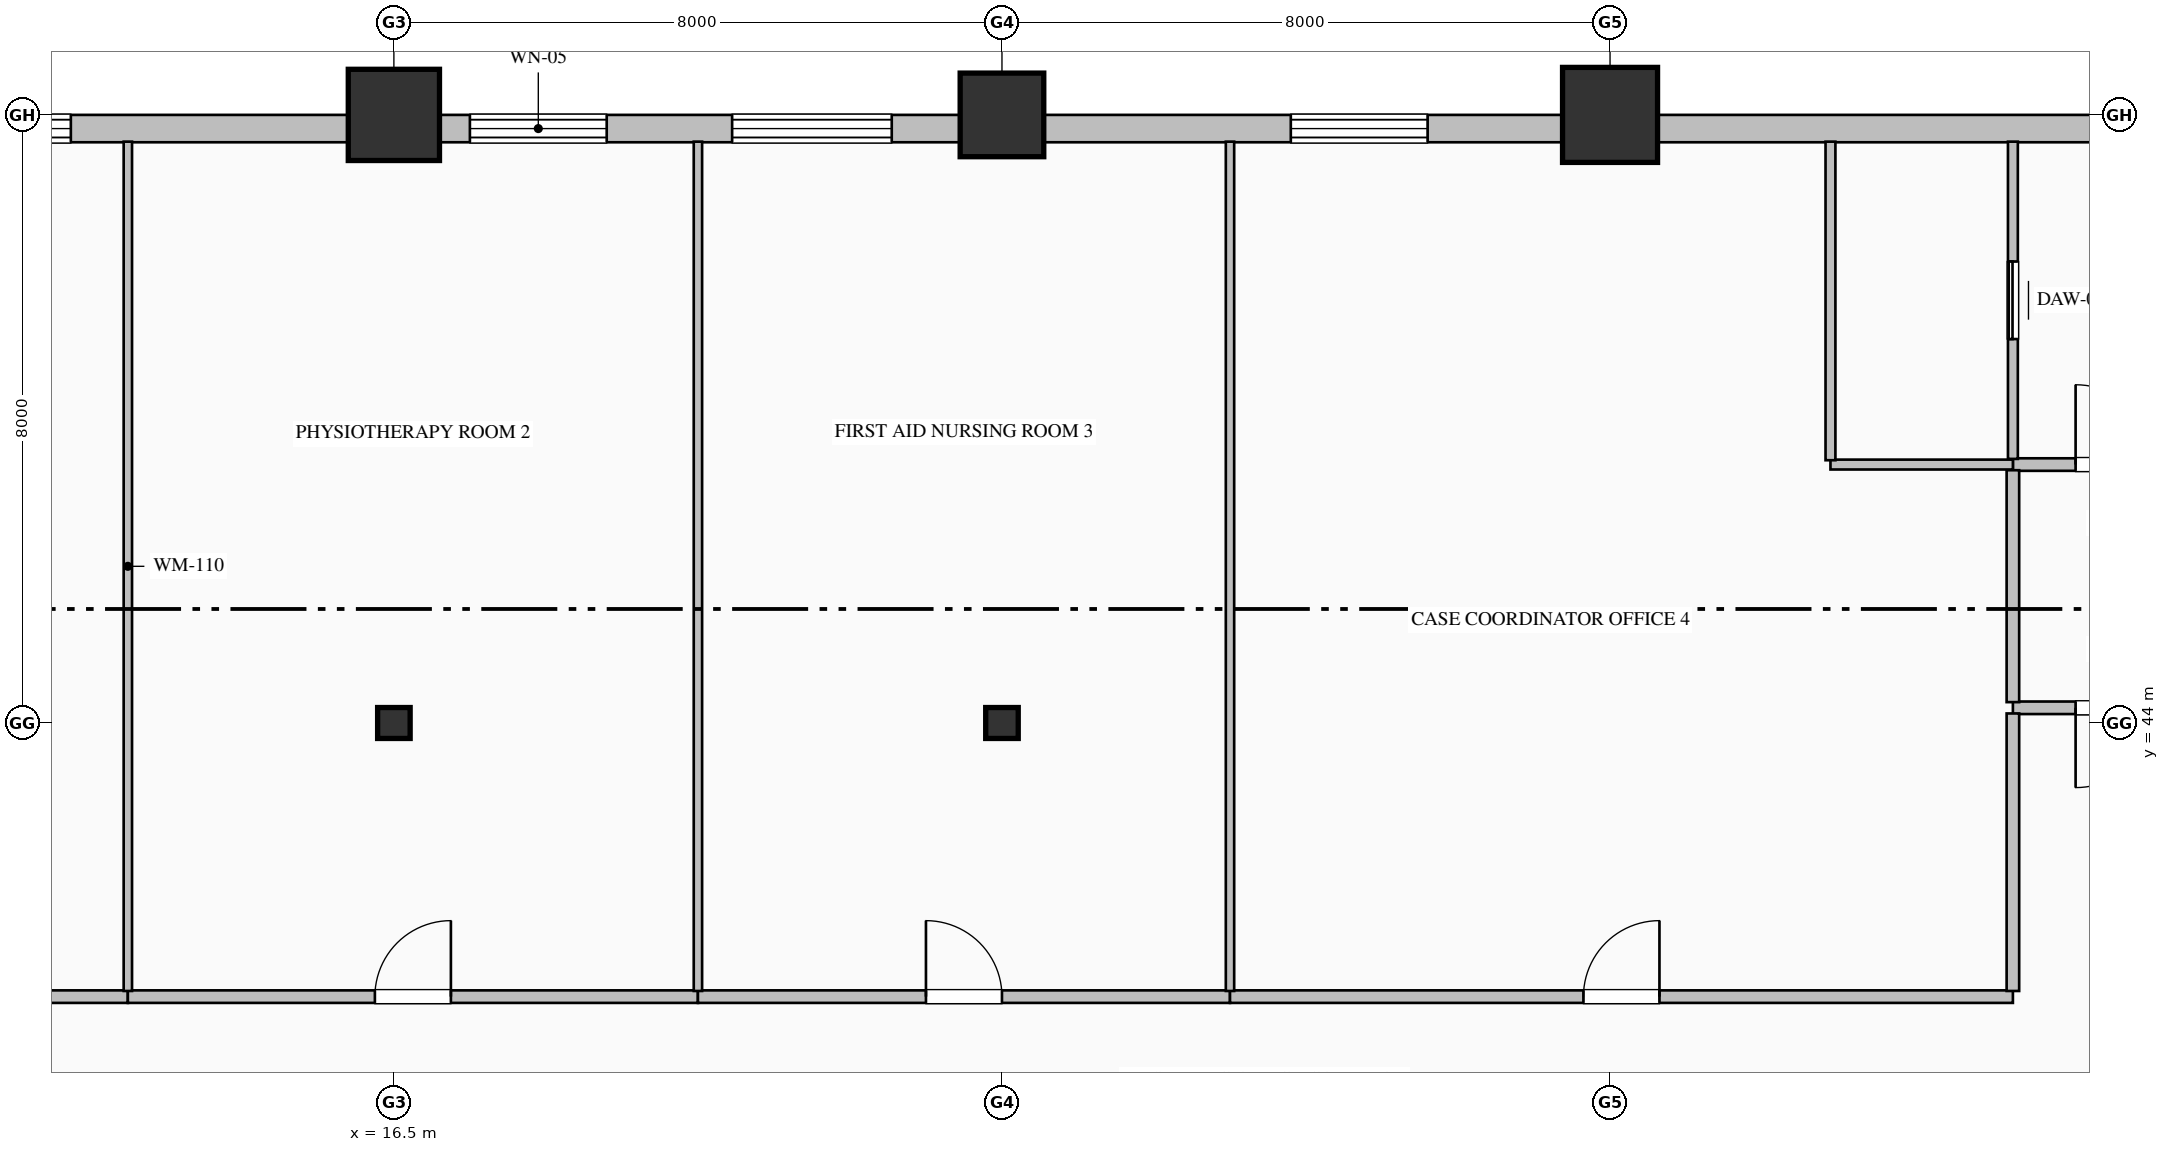
"""IFC4 building model, lengths in metres.
Left out: names, types, materials, properties, quantities, classifications, styles, units other than length and angle.
Written with IfcOpenShell. Run it as: python <this file> out.ifc"""

import sys

from ifc_helpers import new_model, si_unit, direction, frame, frame_2d, origin, origin_2d, place, context, subcontext, project, spatial, rectangle, hollow_rectangle, hollow_circle, i_section, extrude, element, fill, save


model = new_model("IFC4")
c1 = context("Model", 3, precision=1e-05, world=origin(), true_north=direction((0.0, 1.0)))
c2 = subcontext(c1, "Body", "Model", "MODEL_VIEW")
j1 = project(units=[si_unit("LENGTHUNIT", "METRE"), si_unit("PLANEANGLEUNIT", "RADIAN")], contexts=[c1])
p1 = place(None, origin())
s1 = spatial("IfcSite", under=j1, at=p1, CompositionType="ELEMENT")
p2 = place(p1, origin())
s2 = spatial("IfcBuilding", under=s1, at=p2, CompositionType="ELEMENT")
p3 = place(p2, frame((0.0, 0.0, 80.2)))
s3 = spatial("IfcBuildingStorey", under=s2, at=p3, CompositionType="ELEMENT", Elevation=80.2)
p4 = place(p3, frame((16.5, 44.0, 0.0), z_axis=(0.0, 0.0, 1.0), x_axis=(1.0, 0.0, 0.0)))
e1 = element("IfcColumn", 1, at=p4, inside=s3, PredefinedType="COLUMN", context=c2, shape_type="SweptSolid", body=[
    extrude(i_section(OverallWidth=0.407, OverallDepth=0.428, WebThickness=0.02, FlangeThickness=0.035, FilletRadius=0.022, at=origin_2d()), origin(), (0.0, 0.0, 1.0), 4.0),
])
p5 = place(p3, frame((16.5, 52.0, 0.0), z_axis=(0.0, 0.0, 1.0), x_axis=(1.0, 0.0, 0.0)))
e2 = element("IfcColumn", 2, at=p5, inside=s3, PredefinedType="COLUMN", context=c2, shape_type="SweptSolid", body=[
    extrude(hollow_circle(Radius=0.6, WallThickness=0.04, at=origin_2d()), origin(), (0.0, 0.0, 1.0), 4.0),
])
p6 = place(p3, frame((24.5, 44.0, 0.0), z_axis=(0.0, 0.0, 1.0), x_axis=(1.0, 0.0, 0.0)))
e3 = element("IfcColumn", 3, at=p6, inside=s3, PredefinedType="COLUMN", context=c2, shape_type="SweptSolid", body=[
    extrude(i_section(OverallWidth=0.407, OverallDepth=0.428, WebThickness=0.02, FlangeThickness=0.035, FilletRadius=0.022, at=origin_2d()), origin(), (0.0, 0.0, 1.0), 4.0),
])
p7 = place(p3, frame((24.5, 52.0, 0.0), z_axis=(0.0, 0.0, 1.0), x_axis=(1.0, 0.0, 0.0)))
e4 = element("IfcColumn", 4, at=p7, inside=s3, PredefinedType="COLUMN", context=c2, shape_type="SweptSolid", body=[
    extrude(hollow_rectangle(XDim=1.1, YDim=1.1, WallThickness=0.04, at=origin_2d()), origin(), (0.0, 0.0, 1.0), 4.0),
])
p8 = place(p3, frame((32.5, 52.0, 0.0), z_axis=(0.0, 0.0, 1.0), x_axis=(1.0, 0.0, 0.0)))
e5 = element("IfcColumn", 5, at=p8, inside=s3, PredefinedType="COLUMN", context=c2, shape_type="SweptSolid", body=[
    extrude(hollow_rectangle(XDim=1.25, YDim=1.25, WallThickness=0.045, at=origin_2d()), origin(), (0.0, 0.0, 1.0), 4.0),
])
p9 = place(p3, frame((4.0, 51.82, 0.0), z_axis=(0.0, 0.0, 1.0), x_axis=(1.0, 0.0, 0.0)))
e6 = element("IfcWall", 6, at=p9, inside=s3, PredefinedType="SOLIDWALL", context=c2, shape_type="SweptSolid", body=[
    extrude(rectangle(XDim=36.52, YDim=0.36, at=frame_2d((18.26, 0.0))), origin(), (0.0, 0.0, 1.0), 3.25),
])
p10 = place(p9, frame((6.15, 0.0, 0.85)))
e7 = element("IfcOpeningElement", 7, at=p10, cuts=e6, PredefinedType="OPENING", context=c2, shape_type="SweptSolid", body=[
    extrude(rectangle(XDim=2.1, YDim=2.05, at=frame_2d((1.05, 1.025))), frame((0.0, 0.19, 0.0), z_axis=(0.0, -1.0, 0.0), x_axis=(1.0, 0.0, 0.0)), (0.0, 0.0, 1.0), 0.38),
])
p11 = place(p9, frame((13.5, 0.0, 0.85)))
e8 = element("IfcOpeningElement", 8, at=p11, cuts=e6, PredefinedType="OPENING", context=c2, shape_type="SweptSolid", body=[
    extrude(rectangle(XDim=1.8, YDim=2.05, at=frame_2d((0.9, 1.025))), frame((0.0, 0.19, 0.0), z_axis=(0.0, -1.0, 0.0), x_axis=(1.0, 0.0, 0.0)), (0.0, 0.0, 1.0), 0.38),
])
p12 = place(p9, frame((16.95, 0.0, 0.85)))
e9 = element("IfcOpeningElement", 9, at=p12, cuts=e6, PredefinedType="OPENING", context=c2, shape_type="SweptSolid", body=[
    extrude(rectangle(XDim=2.1, YDim=2.05, at=frame_2d((1.05, 1.025))), frame((0.0, 0.19, 0.0), z_axis=(0.0, -1.0, 0.0), x_axis=(1.0, 0.0, 0.0)), (0.0, 0.0, 1.0), 0.38),
])
p13 = place(p9, frame((24.3, 0.0, 0.85)))
e10 = element("IfcOpeningElement", 10, at=p13, cuts=e6, PredefinedType="OPENING", context=c2, shape_type="SweptSolid", body=[
    extrude(rectangle(XDim=1.8, YDim=2.05, at=frame_2d((0.9, 1.025))), frame((0.0, 0.19, 0.0), z_axis=(0.0, -1.0, 0.0), x_axis=(1.0, 0.0, 0.0)), (0.0, 0.0, 1.0), 0.38),
])
p14 = place(p3, frame((37.8, 47.4, 0.0), z_axis=(0.0, 0.0, 1.0), x_axis=(1.0, 0.0, 0.0)))
e11 = element("IfcWall", 11, at=p14, inside=s3, PredefinedType="PARTITIONING", context=c2, shape_type="SweptSolid", body=[
    extrude(rectangle(XDim=2.7, YDim=0.165, at=frame_2d((1.35, 0.0))), origin(), (0.0, 0.0, 1.0), 3.75),
])
p15 = place(p14, frame((0.825, 0.0, 0.0)))
e12 = element("IfcOpeningElement", 12, at=p15, cuts=e11, PredefinedType="OPENING", context=c2, shape_type="SweptSolid", body=[
    extrude(rectangle(XDim=1.05, YDim=2.15, at=frame_2d((0.525, 1.075))), frame((0.0, 0.093, 0.0), z_axis=(0.0, -1.0, 0.0), x_axis=(1.0, 0.0, 0.0)), (0.0, 0.0, 1.0), 0.185),
])
p16 = place(p3, frame((40.5, 44.2, 0.0), z_axis=(0.0, 0.0, 1.0), x_axis=(-1.0, 0.0, 0.0)))
e13 = element("IfcWall", 13, at=p16, inside=s3, PredefinedType="PARTITIONING", context=c2, shape_type="SweptSolid", body=[
    extrude(rectangle(XDim=2.7, YDim=0.165, at=frame_2d((1.35, 0.0))), origin(), (0.0, 0.0, 1.0), 3.75),
])
p17 = place(p16, frame((0.825, 0.0, 0.0)))
e14 = element("IfcOpeningElement", 14, at=p17, cuts=e13, PredefinedType="OPENING", context=c2, shape_type="SweptSolid", body=[
    extrude(rectangle(XDim=1.05, YDim=2.15, at=frame_2d((0.525, 1.075))), frame((0.0, 0.093, 0.0), z_axis=(0.0, -1.0, 0.0), x_axis=(1.0, 0.0, 0.0)), (0.0, 0.0, 1.0), 0.185),
])
p18 = place(p3, frame((37.8, 44.274, 0.0), z_axis=(0.0, 0.0, 1.0), x_axis=(0.0, 1.0, 0.0)))
e15 = element("IfcWall", 15, at=p18, inside=s3, PredefinedType="PARTITIONING", context=c2, shape_type="SweptSolid", body=[
    extrude(rectangle(XDim=3.051, YDim=0.165, at=frame_2d((1.525, 0.0))), origin(), (0.0, 0.0, 1.0), 3.75),
])
p19 = place(p3, frame((37.8, 47.475, 0.0), z_axis=(0.0, 0.0, 1.0), x_axis=(0.0, 1.0, 0.0)))
e16 = element("IfcWall", 16, at=p19, inside=s3, PredefinedType="PARTITIONING", context=c2, shape_type="SweptSolid", body=[
    extrude(rectangle(XDim=4.173, YDim=0.13, at=frame_2d((2.087, 0.0))), origin(), (0.0, 0.0, 1.0), 3.75),
])
p20 = place(p19, frame((1.577, 0.0, 0.0)))
e17 = element("IfcOpeningElement", 17, at=p20, cuts=e16, PredefinedType="OPENING", context=c2, shape_type="SweptSolid", body=[
    extrude(rectangle(XDim=1.02, YDim=2.15, at=frame_2d((0.51, 1.075))), frame((0.0, 0.075, 0.0), z_axis=(0.0, -1.0, 0.0), x_axis=(1.0, 0.0, 0.0)), (0.0, 0.0, 1.0), 0.15),
])
p21 = place(p3, frame((37.8, 47.4, 0.0), z_axis=(0.0, 0.0, 1.0), x_axis=(-1.0, 0.0, 0.0)))
e18 = element("IfcWall", 18, at=p21, inside=s3, PredefinedType="PARTITIONING", context=c2, shape_type="SweptSolid", body=[
    extrude(rectangle(XDim=2.4, YDim=0.13, at=frame_2d((1.2, 0.0))), origin(), (0.0, 0.0, 1.0), 3.75),
])
p22 = place(p3, frame((35.4, 47.457, 0.0), z_axis=(0.0, 0.0, 1.0), x_axis=(0.0, 1.0, 0.0)))
e19 = element("IfcWall", 19, at=p22, inside=s3, PredefinedType="PARTITIONING", context=c2, shape_type="SweptSolid", body=[
    extrude(rectangle(XDim=4.191, YDim=0.13, at=frame_2d((2.095, 0.0))), origin(), (0.0, 0.0, 1.0), 3.75),
])
p23 = place(p3, frame((9.0, 40.4, 0.0), z_axis=(0.0, 0.0, 1.0), x_axis=(1.0, 0.0, 0.0)))
e20 = element("IfcWall", 20, at=p23, inside=s3, PredefinedType="PARTITIONING", context=c2, shape_type="SweptSolid", body=[
    extrude(rectangle(XDim=4.0, YDim=0.165, at=frame_2d((2.0, 0.0))), origin(), (0.0, 0.0, 1.0), 3.75),
])
p24 = place(p23, frame((1.5, 0.0, 0.0)))
e21 = element("IfcOpeningElement", 21, at=p24, cuts=e20, PredefinedType="OPENING", context=c2, shape_type="SweptSolid", body=[
    extrude(rectangle(XDim=1.0, YDim=2.15, at=frame_2d((0.5, 1.075))), frame((0.0, 0.093, 0.0), z_axis=(0.0, -1.0, 0.0), x_axis=(1.0, 0.0, 0.0)), (0.0, 0.0, 1.0), 0.185),
])
p25 = place(p3, frame((13.0, 40.4, 0.0), z_axis=(0.0, 0.0, 1.0), x_axis=(1.0, 0.0, 0.0)))
e22 = element("IfcWall", 22, at=p25, inside=s3, PredefinedType="PARTITIONING", context=c2, shape_type="SweptSolid", body=[
    extrude(rectangle(XDim=7.5, YDim=0.165, at=frame_2d((3.75, 0.0))), origin(), (0.0, 0.0, 1.0), 3.75),
])
p26 = place(p25, frame((3.25, 0.0, 0.0)))
e23 = element("IfcOpeningElement", 23, at=p26, cuts=e22, PredefinedType="OPENING", context=c2, shape_type="SweptSolid", body=[
    extrude(rectangle(XDim=1.0, YDim=2.15, at=frame_2d((0.5, 1.075))), frame((0.0, 0.093, 0.0), z_axis=(0.0, -1.0, 0.0), x_axis=(1.0, 0.0, 0.0)), (0.0, 0.0, 1.0), 0.185),
])
p27 = place(p3, frame((20.5, 40.4, 0.0), z_axis=(0.0, 0.0, 1.0), x_axis=(1.0, 0.0, 0.0)))
e24 = element("IfcWall", 24, at=p27, inside=s3, PredefinedType="PARTITIONING", context=c2, shape_type="SweptSolid", body=[
    extrude(rectangle(XDim=7.0, YDim=0.165, at=frame_2d((3.5, 0.0))), origin(), (0.0, 0.0, 1.0), 3.75),
])
p28 = place(p27, frame((3.0, 0.0, 0.0)))
e25 = element("IfcOpeningElement", 25, at=p28, cuts=e24, PredefinedType="OPENING", context=c2, shape_type="SweptSolid", body=[
    extrude(rectangle(XDim=1.0, YDim=2.15, at=frame_2d((0.5, 1.075))), frame((0.0, 0.093, 0.0), z_axis=(0.0, -1.0, 0.0), x_axis=(1.0, 0.0, 0.0)), (0.0, 0.0, 1.0), 0.185),
])
p29 = place(p3, frame((27.5, 40.4, 0.0), z_axis=(0.0, 0.0, 1.0), x_axis=(1.0, 0.0, 0.0)))
e26 = element("IfcWall", 26, at=p29, inside=s3, PredefinedType="PARTITIONING", context=c2, shape_type="SweptSolid", body=[
    extrude(rectangle(XDim=10.3, YDim=0.165, at=frame_2d((5.15, 0.0))), origin(), (0.0, 0.0, 1.0), 3.75),
])
p30 = place(p29, frame((4.65, 0.0, 0.0)))
e27 = element("IfcOpeningElement", 27, at=p30, cuts=e26, PredefinedType="OPENING", context=c2, shape_type="SweptSolid", body=[
    extrude(rectangle(XDim=1.0, YDim=2.15, at=frame_2d((0.5, 1.075))), frame((0.0, 0.093, 0.0), z_axis=(0.0, -1.0, 0.0), x_axis=(1.0, 0.0, 0.0)), (0.0, 0.0, 1.0), 0.185),
])
p31 = place(p3, frame((37.8, 40.475, 0.0), z_axis=(0.0, 0.0, 1.0), x_axis=(0.0, 1.0, 0.0)))
e28 = element("IfcWall", 28, at=p31, inside=s3, PredefinedType="PARTITIONING", context=c2, shape_type="SweptSolid", body=[
    extrude(rectangle(XDim=3.651, YDim=0.165, at=frame_2d((1.825, 0.0))), origin(), (0.0, 0.0, 1.0), 3.75),
])
for number, where, z_axis, x_axis in (
    (29, (13.0, 51.648, 0.0), (0.0, 0.0, 1.0), (0.0, -1.0, 0.0)),
    (30, (20.5, 51.648, 0.0), (0.0, 0.0, 1.0), (0.0, -1.0, 0.0)),
    (31, (27.5, 51.648, 0.0), (0.0, 0.0, 1.0), (0.0, -1.0, 0.0)),
):
    element("IfcWall", number, at=place(p3, frame(where, z_axis=z_axis, x_axis=x_axis)), inside=s3, PredefinedType="MOVABLE", context=c2, shape_type="SweptSolid", body=[
        extrude(rectangle(XDim=11.173, YDim=0.11, at=frame_2d((5.587, 0.0))), origin(), (0.0, 0.0, 1.0), 3.75),
    ])
p32 = place(p10, origin())
e32 = element("IfcWindow", 32, at=p32, inside=s3, PartitioningType="TRIPLE_PANEL_VERTICAL", PredefinedType="WINDOW", context=c2, shape_type="SweptSolid", body=[
    extrude(rectangle(XDim=2.1, YDim=2.05, at=frame_2d((1.05, 1.025))), frame((0.0, 0.15, 0.0), z_axis=(0.0, -1.0, 0.0), x_axis=(1.0, 0.0, 0.0)), (0.0, 0.0, 1.0), 0.06),
])
fill(e7, e32)
p33 = place(p11, origin())
e33 = element("IfcWindow", 33, at=p33, inside=s3, PartitioningType="TRIPLE_PANEL_VERTICAL", PredefinedType="WINDOW", context=c2, shape_type="SweptSolid", body=[
    extrude(rectangle(XDim=1.8, YDim=2.05, at=frame_2d((0.9, 1.025))), frame((0.0, 0.15, 0.0), z_axis=(0.0, -1.0, 0.0), x_axis=(1.0, 0.0, 0.0)), (0.0, 0.0, 1.0), 0.06),
])
fill(e8, e33)
p34 = place(p12, origin())
e34 = element("IfcWindow", 34, at=p34, inside=s3, PartitioningType="TRIPLE_PANEL_VERTICAL", PredefinedType="WINDOW", context=c2, shape_type="SweptSolid", body=[
    extrude(rectangle(XDim=2.1, YDim=2.05, at=frame_2d((1.05, 1.025))), frame((0.0, 0.15, 0.0), z_axis=(0.0, -1.0, 0.0), x_axis=(1.0, 0.0, 0.0)), (0.0, 0.0, 1.0), 0.06),
])
fill(e9, e34)
p35 = place(p13, origin())
e35 = element("IfcWindow", 35, at=p35, inside=s3, PartitioningType="TRIPLE_PANEL_VERTICAL", PredefinedType="WINDOW", context=c2, shape_type="SweptSolid", body=[
    extrude(rectangle(XDim=1.8, YDim=2.05, at=frame_2d((0.9, 1.025))), frame((0.0, 0.15, 0.0), z_axis=(0.0, -1.0, 0.0), x_axis=(1.0, 0.0, 0.0)), (0.0, 0.0, 1.0), 0.06),
])
fill(e10, e35)
p36 = place(p15, origin())
e36 = element("IfcDoor", 36, at=p36, inside=s3, OperationType="SINGLE_SWING_LEFT", PredefinedType="DOOR", context=c2, shape_type="SweptSolid", body=[
    extrude(rectangle(XDim=1.05, YDim=2.15, at=frame_2d((0.525, 1.075))), frame((0.0, 0.025, 0.0), z_axis=(0.0, -1.0, 0.0), x_axis=(1.0, 0.0, 0.0)), (0.0, 0.0, 1.0), 0.05),
])
fill(e12, e36)
p37 = place(p17, origin())
e37 = element("IfcDoor", 37, at=p37, inside=s3, OperationType="SINGLE_SWING_RIGHT", PredefinedType="DOOR", context=c2, shape_type="SweptSolid", body=[
    extrude(rectangle(XDim=1.05, YDim=2.15, at=frame_2d((0.525, 1.075))), frame((0.0, 0.025, 0.0), z_axis=(0.0, -1.0, 0.0), x_axis=(1.0, 0.0, 0.0)), (0.0, 0.0, 1.0), 0.05),
])
fill(e14, e37)
p38 = place(p20, origin())
e38 = element("IfcDoor", 38, at=p38, inside=s3, OperationType="SLIDING_TO_LEFT", PredefinedType="DOOR", context=c2, shape_type="SweptSolid", body=[
    extrude(rectangle(XDim=1.02, YDim=2.15, at=frame_2d((0.51, 1.075))), frame((0.0, 0.025, 0.0), z_axis=(0.0, -1.0, 0.0), x_axis=(1.0, 0.0, 0.0)), (0.0, 0.0, 1.0), 0.05),
])
fill(e17, e38)
p39 = place(p26, origin())
e39 = element("IfcDoor", 39, at=p39, inside=s3, OperationType="SINGLE_SWING_RIGHT", PredefinedType="DOOR", context=c2, shape_type="SweptSolid", body=[
    extrude(rectangle(XDim=1.0, YDim=2.15, at=frame_2d((0.5, 1.075))), frame((0.0, 0.025, 0.0), z_axis=(0.0, -1.0, 0.0), x_axis=(1.0, 0.0, 0.0)), (0.0, 0.0, 1.0), 0.05),
])
fill(e23, e39)
p40 = place(p28, origin())
e40 = element("IfcDoor", 40, at=p40, inside=s3, OperationType="SINGLE_SWING_LEFT", PredefinedType="DOOR", context=c2, shape_type="SweptSolid", body=[
    extrude(rectangle(XDim=1.0, YDim=2.15, at=frame_2d((0.5, 1.075))), frame((0.0, 0.025, 0.0), z_axis=(0.0, -1.0, 0.0), x_axis=(1.0, 0.0, 0.0)), (0.0, 0.0, 1.0), 0.05),
])
fill(e25, e40)
p41 = place(p30, origin())
e41 = element("IfcDoor", 41, at=p41, inside=s3, OperationType="SINGLE_SWING_RIGHT", PredefinedType="DOOR", context=c2, shape_type="SweptSolid", body=[
    extrude(rectangle(XDim=1.0, YDim=2.15, at=frame_2d((0.5, 1.075))), frame((0.0, 0.025, 0.0), z_axis=(0.0, -1.0, 0.0), x_axis=(1.0, 0.0, 0.0)), (0.0, 0.0, 1.0), 0.05),
])
fill(e27, e41)
save(model, sys.argv[1])
